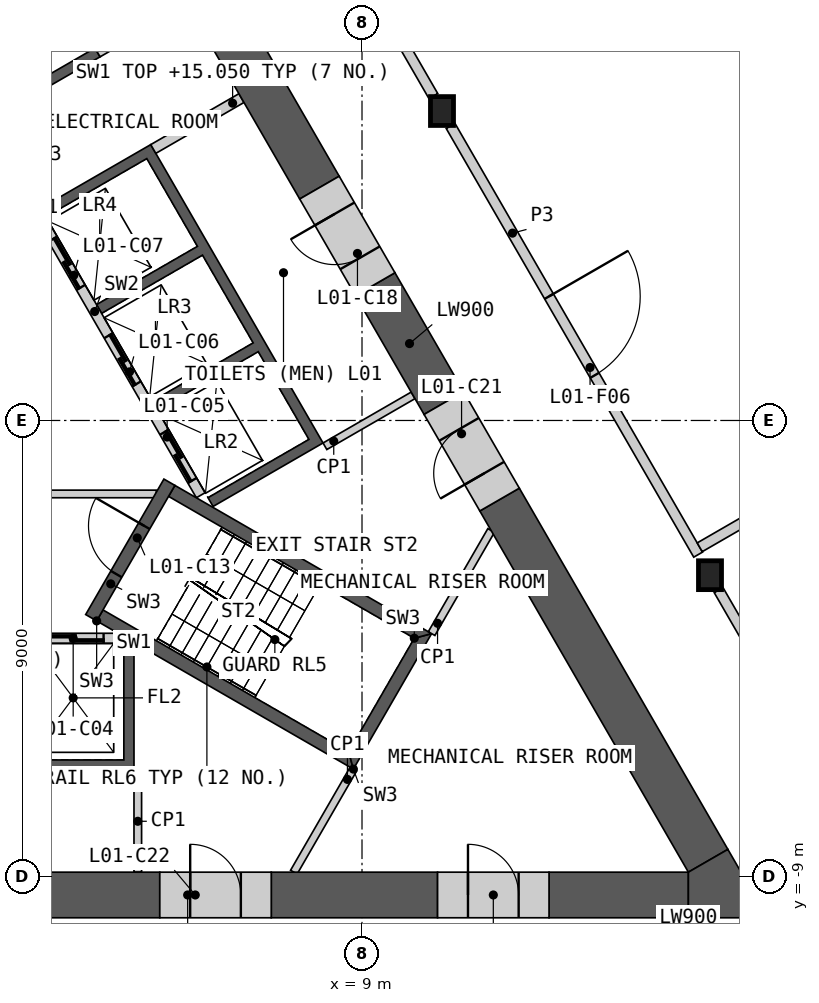
"""IFC4 building model, lengths in metres.
Left out: names, types, materials, properties, quantities, classifications, styles, units other than length and angle.
Written with IfcOpenShell. Run it as: python <this file> out.ifc"""

import sys

from ifc_helpers import new_model, si_unit, direction, frame, frame_2d, origin, origin_2d, place, context, subcontext, project, spatial, polyline, rectangle, i_section, outline, extrude, element, fill, save


model = new_model("IFC4")
c1 = context("Model", 3, precision=1e-05, world=origin(), true_north=direction((0.0, 1.0)))
c2 = subcontext(c1, "Body", "Model", "MODEL_VIEW")
j1 = project(units=[si_unit("LENGTHUNIT", "METRE"), si_unit("PLANEANGLEUNIT", "RADIAN")], contexts=[c1])
p1 = place(None, origin())
s1 = spatial("IfcSite", under=j1, at=p1, CompositionType="ELEMENT")
p2 = place(p1, origin())
s2 = spatial("IfcBuilding", under=s1, at=p2, CompositionType="ELEMENT")
p3 = place(p2, frame((0.0, 0.0, 10.0)))
s3 = spatial("IfcBuildingStorey", under=s2, at=p3, CompositionType="ELEMENT", Elevation=10.0)
for number, where, z_axis, x_axis in (
    (1, (15.868, -3.054, 0.0), (0.0, 0.0, 1.0), (1.0, 0.0, 0.0)),
    (2, (10.578, 6.107, 0.0), (0.0, 0.0, 1.0), (1.0, 0.0, 0.0)),
):
    element("IfcColumn", number, at=place(p3, frame(where, z_axis=z_axis, x_axis=x_axis)), inside=s3, PredefinedType="COLUMN", context=c2, shape_type="SweptSolid", body=[
        extrude(i_section(OverallWidth=0.454, OverallDepth=0.57, WebThickness=0.078, FlangeThickness=0.125, at=origin_2d()), origin(), (0.0, 0.0, 1.0), 5.5),
    ])
p4 = place(p3, origin())
e3 = element("IfcWall", 3, at=p4, inside=s3, PredefinedType="SHEAR", context=c2, shape_type="SweptSolid", body=[
    extrude(outline(polyline([(4.5, -4.4), (4.5, -6.906), (-4.5, -6.906), (-4.5, -4.4), (-4.3, -4.4), (-4.3, -6.7), (-2.3, -6.7), (-2.3, -4.4), (-2.1, -4.4), (-2.1, -6.7), (-0.1, -6.7), (-0.1, -4.4), (0.1, -4.4), (0.1, -6.7), (2.1, -6.7), (2.1, -4.4), (2.3, -4.4), (2.3, -6.7), (4.3, -6.7), (4.3, -4.4), (4.5, -4.4)])), origin(), (0.0, 0.0, 1.0), 5.05),
])
p5 = place(p3, frame((-4.187, -4.3, 0.0), z_axis=(0.0, 0.0, 1.0), x_axis=(1.0, 0.0, 0.0)))
e4 = element("IfcWall", 4, at=p5, inside=s3, PredefinedType="SOLIDWALL", context=c2, shape_type="SweptSolid", body=[
    extrude(rectangle(XDim=8.373, YDim=0.2, at=frame_2d((4.187, 0.0))), origin(), (0.0, 0.0, 1.0), 5.05),
])
p6 = place(p5, frame((0.287, 0.0, 0.0)))
e5 = element("IfcOpeningElement", 5, at=p6, cuts=e4, PredefinedType="OPENING", context=c2, shape_type="SweptSolid", body=[
    extrude(rectangle(XDim=1.2, YDim=2.1, at=frame_2d((0.6, 1.05))), frame((0.0, 0.11, 0.0), z_axis=(0.0, -1.0, 0.0), x_axis=(1.0, 0.0, 0.0)), (0.0, 0.0, 1.0), 0.22),
])
p7 = place(p5, frame((2.387, 0.0, 0.0)))
e6 = element("IfcOpeningElement", 6, at=p7, cuts=e4, PredefinedType="OPENING", context=c2, shape_type="SweptSolid", body=[
    extrude(rectangle(XDim=1.4, YDim=2.1, at=frame_2d((0.7, 1.05))), frame((0.0, 0.11, 0.0), z_axis=(0.0, -1.0, 0.0), x_axis=(1.0, 0.0, 0.0)), (0.0, 0.0, 1.0), 0.22),
])
p8 = place(p5, frame((4.737, 0.0, 0.0)))
e7 = element("IfcOpeningElement", 7, at=p8, cuts=e4, PredefinedType="OPENING", context=c2, shape_type="SweptSolid", body=[
    extrude(rectangle(XDim=1.1, YDim=2.1, at=frame_2d((0.55, 1.05))), frame((0.0, 0.11, 0.0), z_axis=(0.0, -1.0, 0.0), x_axis=(1.0, 0.0, 0.0)), (0.0, 0.0, 1.0), 0.22),
])
p9 = place(p5, frame((6.887, 0.0, 0.0)))
e8 = element("IfcOpeningElement", 8, at=p9, cuts=e4, PredefinedType="OPENING", context=c2, shape_type="SweptSolid", body=[
    extrude(rectangle(XDim=1.2, YDim=2.1, at=frame_2d((0.6, 1.05))), frame((0.0, 0.11, 0.0), z_axis=(0.0, -1.0, 0.0), x_axis=(1.0, 0.0, 0.0)), (0.0, 0.0, 1.0), 0.22),
])
p10 = place(p3, origin())
e9 = element("IfcWall", 9, at=p10, inside=s3, PredefinedType="SHEAR", context=c2, shape_type="SweptSolid", body=[
    extrude(outline(polyline([(1.561, 6.097), (3.731, 7.35), (3.831, 7.177), (1.66, 5.924), (1.561, 6.097)])), origin(), (0.0, 0.0, 1.0), 5.05),
])
p11 = place(p3, origin())
e10 = element("IfcWall", 10, at=p11, inside=s3, PredefinedType="SHEAR", context=c2, shape_type="SweptSolid", body=[
    extrude(outline(polyline([(2.66, 4.192), (4.831, 5.445), (8.231, -0.444), (6.061, -1.697), (5.96, -1.524), (7.952, -0.374), (6.952, 1.358), (4.96, 0.208), (4.861, 0.381), (6.852, 1.531), (5.852, 3.263), (3.861, 2.113), (3.76, 2.287), (5.752, 3.437), (4.752, 5.169), (2.76, 4.019), (2.66, 4.192)])), origin(), (0.0, 0.0, 1.0), 5.05),
])
p12 = place(p3, frame((5.817, -1.476, 0.0), z_axis=(0.0, 0.0, 1.0), x_axis=(-0.500002616675, 0.866023893041, 0.0)))
e11 = element("IfcWall", 11, at=p12, inside=s3, PredefinedType="SOLIDWALL", context=c2, shape_type="SweptSolid", body=[
    extrude(rectangle(XDim=8.373, YDim=0.2, at=frame_2d((4.187, 0.0))), origin(), (0.0, 0.0, 1.0), 5.05),
])
p13 = place(p12, frame((0.337, 0.0, 0.0)))
e12 = element("IfcOpeningElement", 12, at=p13, cuts=e11, PredefinedType="OPENING", context=c2, shape_type="SweptSolid", body=[
    extrude(rectangle(XDim=1.1, YDim=2.1, at=frame_2d((0.55, 1.05))), frame((0.0, 0.11, 0.0), z_axis=(0.0, -1.0, 0.0), x_axis=(1.0, 0.0, 0.0)), (0.0, 0.0, 1.0), 0.22),
])
p14 = place(p12, frame((2.537, 0.0, 0.0)))
e13 = element("IfcOpeningElement", 13, at=p14, cuts=e11, PredefinedType="OPENING", context=c2, shape_type="SweptSolid", body=[
    extrude(rectangle(XDim=1.1, YDim=2.1, at=frame_2d((0.55, 1.05))), frame((0.0, 0.11, 0.0), z_axis=(0.0, -1.0, 0.0), x_axis=(1.0, 0.0, 0.0)), (0.0, 0.0, 1.0), 0.22),
])
p15 = place(p12, frame((4.737, 0.0, 0.0)))
e14 = element("IfcOpeningElement", 14, at=p15, cuts=e11, PredefinedType="OPENING", context=c2, shape_type="SweptSolid", body=[
    extrude(rectangle(XDim=1.1, YDim=2.1, at=frame_2d((0.55, 1.05))), frame((0.0, 0.11, 0.0), z_axis=(0.0, -1.0, 0.0), x_axis=(1.0, 0.0, 0.0)), (0.0, 0.0, 1.0), 0.22),
])
p16 = place(p12, frame((7.037, 0.0, 0.0)))
e15 = element("IfcOpeningElement", 15, at=p16, cuts=e11, PredefinedType="OPENING", context=c2, shape_type="SweptSolid", body=[
    extrude(rectangle(XDim=0.9, YDim=2.1, at=frame_2d((0.45, 1.05))), frame((0.0, 0.11, 0.0), z_axis=(0.0, -1.0, 0.0), x_axis=(1.0, 0.0, 0.0)), (0.0, 0.0, 1.0), 0.22),
])
p17 = place(p3, frame((4.881, 5.358, 0.0), z_axis=(0.0, 0.0, 1.0), x_axis=(0.866035824272, 0.499981950752, 0.0)))
e16 = element("IfcWall", 16, at=p17, inside=s3, PredefinedType="SHEAR", context=c2, shape_type="SweptSolid", body=[
    extrude(rectangle(XDim=2.009, YDim=0.2, at=frame_2d((1.004, 0.0))), origin(), (0.0, 0.0, 1.0), 5.05),
])
p18 = place(p3, frame((3.781, 7.263, 0.0), z_axis=(0.0, 0.0, 1.0), x_axis=(0.865983199114, 0.50007309351, 0.0)))
e17 = element("IfcWall", 17, at=p18, inside=s3, PredefinedType="SHEAR", context=c2, shape_type="SweptSolid", body=[
    extrude(rectangle(XDim=2.009, YDim=0.2, at=frame_2d((1.004, 0.0))), origin(), (0.0, 0.0, 1.0), 5.05),
])
p19 = place(p3, frame((-4.941, -1.45, 0.0), z_axis=(0.0, 0.0, 1.0), x_axis=(1.0, 0.0, 0.0)))
e18 = element("IfcWall", 18, at=p19, inside=s3, PredefinedType="PARTITIONING", context=c2, shape_type="SweptSolid", body=[
    extrude(rectangle(XDim=9.882, YDim=0.15, at=frame_2d((4.941, 0.0))), origin(), (0.0, 0.0, 1.0), 5.05),
])
p20 = place(p19, frame((4.391, 0.0, 0.0)))
e19 = element("IfcOpeningElement", 19, at=p20, cuts=e18, PredefinedType="OPENING", context=c2, shape_type="SweptSolid", body=[
    extrude(rectangle(XDim=1.1, YDim=2.1, at=frame_2d((0.55, 1.05))), frame((0.0, 0.085, 0.0), z_axis=(0.0, -1.0, 0.0), x_axis=(1.0, 0.0, 0.0)), (0.0, 0.0, 1.0), 0.17),
])
p21 = place(p3, origin())
e20 = element("IfcWall", 20, at=p21, inside=s3, PredefinedType="SHEAR", context=c2, shape_type="SweptSolid", body=[
    extrude(outline(polyline([(3.763, -3.956), (8.83, -6.881), (8.738, -6.539), (3.888, -3.739), (3.763, -3.956)])), origin(), (0.0, 0.0, 1.0), 5.05),
])
p22 = place(p3, origin())
e21 = element("IfcWall", 21, at=p22, inside=s3, PredefinedType="SHEAR", context=c2, shape_type="SweptSolid", body=[
    extrude(outline(polyline([(8.83, -6.881), (10.374, -4.206), (10.032, -4.298), (8.738, -6.539), (8.83, -6.881)])), origin(), (0.0, 0.0, 1.0), 5.05),
])
p23 = place(p3, origin())
e22 = element("IfcWall", 22, at=p23, inside=s3, PredefinedType="SHEAR", context=c2, shape_type="SweptSolid", body=[
    extrude(outline(polyline([(10.032, -4.298), (10.374, -4.206), (5.307, -1.281), (5.182, -1.498), (10.032, -4.298)])), origin(), (0.0, 0.0, 1.0), 5.05),
])
p24 = place(p3, frame((3.655, -3.893, 0.0), z_axis=(0.0, 0.0, 1.0), x_axis=(0.499982516597, 0.866035497597, 0.0)))
e23 = element("IfcWall", 23, at=p24, inside=s3, PredefinedType="SHEAR", context=c2, shape_type="SweptSolid", body=[
    extrude(rectangle(XDim=3.088, YDim=0.25, at=frame_2d((1.544, 0.0))), origin(), (0.0, 0.0, 1.0), 5.05),
])
p25 = place(p24, frame((0.994, 0.0, 0.0)))
e24 = element("IfcOpeningElement", 24, at=p25, cuts=e23, PredefinedType="OPENING", context=c2, shape_type="SweptSolid", body=[
    extrude(rectangle(XDim=1.1, YDim=2.1, at=frame_2d((0.55, 1.05))), frame((0.0, 0.135, 0.0), z_axis=(0.0, -1.0, 0.0), x_axis=(1.0, 0.0, 0.0)), (0.0, 0.0, 1.0), 0.27),
])
p26 = place(p3, frame((4.575, -6.906, 0.0), z_axis=(0.0, 0.0, 1.0), x_axis=(0.0, -1.0, 0.0)))
e25 = element("IfcWall", 25, at=p26, inside=s3, PredefinedType="PARTITIONING", context=c2, shape_type="SweptSolid", body=[
    extrude(rectangle(XDim=2.009, YDim=0.15, at=frame_2d((1.004, 0.0))), origin(), (0.0, 0.0, 1.0), 5.05),
])
p27 = place(p3, frame((8.268, -0.509, 0.0), z_axis=(0.0, 0.0, 1.0), x_axis=(0.866035824272, 0.499981950752, 0.0)))
e26 = element("IfcWall", 26, at=p27, inside=s3, PredefinedType="PARTITIONING", context=c2, shape_type="SweptSolid", body=[
    extrude(rectangle(XDim=2.009, YDim=0.15, at=frame_2d((1.004, 0.0))), origin(), (0.0, 0.0, 1.0), 5.05),
])
p28 = place(p3, frame((8.83, -6.881, 0.0), z_axis=(0.0, 0.0, 1.0), x_axis=(-0.500073279432, -0.865983091751, 0.0)))
e27 = element("IfcWall", 27, at=p28, inside=s3, PredefinedType="PARTITIONING", context=c2, shape_type="SweptSolid", body=[
    extrude(rectangle(XDim=2.349, YDim=0.15, at=frame_2d((1.175, 0.0))), origin(), (0.0, 0.0, 1.0), 5.05),
])
p29 = place(p3, frame((10.374, -4.206, 0.0), z_axis=(0.0, 0.0, 1.0), x_axis=(0.499995339376, 0.86602809458, 0.0)))
e28 = element("IfcWall", 28, at=p29, inside=s3, PredefinedType="PARTITIONING", context=c2, shape_type="SweptSolid", body=[
    extrude(rectangle(XDim=2.349, YDim=0.15, at=frame_2d((1.175, 0.0))), origin(), (0.0, 0.0, 1.0), 5.05),
])
p30 = place(p3, frame((1.1, -9.365, 0.0), z_axis=(0.0, 0.0, 1.0), x_axis=(1.0, 0.0, 0.0)))
e29 = element("IfcWall", 29, at=p30, inside=s3, PredefinedType="SHEAR", context=c2, shape_type="SweptSolid", body=[
    extrude(rectangle(XDim=3.909, YDim=0.9, at=frame_2d((1.955, 0.0))), origin(), (0.0, 0.0, 1.0), 5.05),
])
p31 = place(p3, frame((7.209, -9.365, 0.0), z_axis=(0.0, 0.0, 1.0), x_axis=(1.0, 0.0, 0.0)))
e30 = element("IfcWall", 30, at=p31, inside=s3, PredefinedType="SHEAR", context=c2, shape_type="SweptSolid", body=[
    extrude(rectangle(XDim=3.282, YDim=0.9, at=frame_2d((1.641, 0.0))), origin(), (0.0, 0.0, 1.0), 5.05),
])
p32 = place(p3, frame((12.691, -9.365, 0.0), z_axis=(0.0, 0.0, 1.0), x_axis=(1.0, 0.0, 0.0)))
e31 = element("IfcWall", 31, at=p32, inside=s3, PredefinedType="SHEAR", context=c2, shape_type="SweptSolid", body=[
    extrude(rectangle(XDim=2.75, YDim=0.9, at=frame_2d((1.375, 0.0))), origin(), (0.0, 0.0, 1.0), 5.05),
])
p33 = place(p3, frame((8.16, 4.596, 0.0), z_axis=(0.0, 0.0, 1.0), x_axis=(-0.500009830349, 0.866019728156, 0.0)))
e32 = element("IfcWall", 32, at=p33, inside=s3, PredefinedType="SHEAR", context=c2, shape_type="SweptSolid", body=[
    extrude(rectangle(XDim=15.541, YDim=0.9, at=frame_2d((7.771, 0.0))), origin(), (0.0, 0.0, 1.0), 5.05),
])
p34 = place(p3, frame((15.831, -8.69, 0.0), z_axis=(0.0, 0.0, 1.0), x_axis=(-0.499995435471, 0.8660280391, 0.0)))
e33 = element("IfcWall", 33, at=p34, inside=s3, PredefinedType="SHEAR", context=c2, shape_type="SweptSolid", body=[
    extrude(rectangle(XDim=8.232, YDim=0.9, at=frame_2d((4.116, 0.0))), origin(), (0.0, 0.0, 1.0), 5.05),
])
p35 = place(p3, frame((10.615, 0.344, 0.0), z_axis=(0.0, 0.0, 1.0), x_axis=(-0.500044870432, 0.865999496279, 0.0)))
e34 = element("IfcWall", 34, at=p35, inside=s3, PredefinedType="SHEAR", context=c2, shape_type="SweptSolid", body=[
    extrude(rectangle(XDim=2.709, YDim=0.9, at=frame_2d((1.354, 0.0))), origin(), (0.0, 0.0, 1.0), 5.05),
])
p36 = place(p3, origin())
e35 = element("IfcWall", 35, at=p36, inside=s3, PredefinedType="SHEAR", context=c2, shape_type="SweptSolid", body=[
    extrude(outline(polyline([(15.441, -9.815), (15.441, -8.915), (16.221, -8.465), (17.0, -9.815), (15.441, -9.815)])), origin(), (0.0, 0.0, 1.0), 5.05),
])
p37 = place(p3, frame((10.491, -9.365, 0.0), z_axis=(0.0, 0.0, 1.0), x_axis=(1.0, 0.0, 0.0)))
e36 = element("IfcWall", 36, at=p37, inside=s3, PredefinedType="SHEAR", context=c2, shape_type="SweptSolid", body=[
    extrude(rectangle(XDim=2.2, YDim=0.9, at=frame_2d((1.1, 0.0))), origin(), (0.0, 0.0, 1.0), 5.05),
])
p38 = place(p37, frame((0.6, 0.0, 0.0)))
e37 = element("IfcOpeningElement", 37, at=p38, cuts=e36, PredefinedType="OPENING", context=c2, shape_type="SweptSolid", body=[
    extrude(rectangle(XDim=1.0, YDim=2.1, at=frame_2d((0.5, 1.05))), frame((0.0, 0.46, 0.0), z_axis=(0.0, -1.0, 0.0), x_axis=(1.0, 0.0, 0.0)), (0.0, 0.0, 1.0), 0.92),
])
p39 = place(p3, frame((9.26, 2.691, 0.0), z_axis=(0.0, 0.0, 1.0), x_axis=(-0.499946605688, 0.86605622881, 0.0)))
e38 = element("IfcWall", 38, at=p39, inside=s3, PredefinedType="SHEAR", context=c2, shape_type="SweptSolid", body=[
    extrude(rectangle(XDim=2.2, YDim=0.9, at=frame_2d((1.1, 0.0))), origin(), (0.0, 0.0, 1.0), 5.05),
])
p40 = place(p39, frame((0.6, 0.0, 0.0)))
e39 = element("IfcOpeningElement", 39, at=p40, cuts=e38, PredefinedType="OPENING", context=c2, shape_type="SweptSolid", body=[
    extrude(rectangle(XDim=1.0, YDim=2.1, at=frame_2d((0.5, 1.05))), frame((0.0, 0.46, 0.0), z_axis=(0.0, -1.0, 0.0), x_axis=(1.0, 0.0, 0.0)), (0.0, 0.0, 1.0), 0.92),
])
p41 = place(p3, frame((11.715, -1.561, 0.0), z_axis=(0.0, 0.0, 1.0), x_axis=(-0.499946605688, 0.86605622881, 0.0)))
e40 = element("IfcWall", 40, at=p41, inside=s3, PredefinedType="SHEAR", context=c2, shape_type="SweptSolid", body=[
    extrude(rectangle(XDim=2.2, YDim=0.9, at=frame_2d((1.1, 0.0))), origin(), (0.0, 0.0, 1.0), 5.05),
])
p42 = place(p41, frame((0.6, 0.0, 0.0)))
e41 = element("IfcOpeningElement", 41, at=p42, cuts=e40, PredefinedType="OPENING", context=c2, shape_type="SweptSolid", body=[
    extrude(rectangle(XDim=1.0, YDim=2.1, at=frame_2d((0.5, 1.05))), frame((0.0, 0.46, 0.0), z_axis=(0.0, -1.0, 0.0), x_axis=(1.0, 0.0, 0.0)), (0.0, 0.0, 1.0), 0.92),
])
p43 = place(p3, frame((5.009, -9.365, 0.0), z_axis=(0.0, 0.0, 1.0), x_axis=(1.0, 0.0, 0.0)))
e42 = element("IfcWall", 42, at=p43, inside=s3, PredefinedType="SHEAR", context=c2, shape_type="SweptSolid", body=[
    extrude(rectangle(XDim=2.2, YDim=0.9, at=frame_2d((1.1, 0.0))), origin(), (0.0, 0.0, 1.0), 5.05),
])
p44 = place(p43, frame((0.6, 0.0, 0.0)))
e43 = element("IfcOpeningElement", 43, at=p44, cuts=e42, PredefinedType="OPENING", context=c2, shape_type="SweptSolid", body=[
    extrude(rectangle(XDim=1.0, YDim=2.1, at=frame_2d((0.5, 1.05))), frame((0.0, 0.46, 0.0), z_axis=(0.0, -1.0, 0.0), x_axis=(1.0, 0.0, 0.0)), (0.0, 0.0, 1.0), 0.92),
])
p45 = place(p3, frame((5.459, 14.974, 0.0), z_axis=(0.0, 0.0, 1.0), x_axis=(0.499985793049, -0.866033606016, 0.0)))
e44 = element("IfcWall", 44, at=p45, inside=s3, PredefinedType="PARTITIONING", context=c2, shape_type="SweptSolid", body=[
    extrude(rectangle(XDim=9.898, YDim=0.2, at=frame_2d((4.949, 0.0))), origin(), (0.0, 0.0, 1.0), 5.05),
])
p46 = place(p3, frame((10.749, 5.813, 0.0), z_axis=(0.0, 0.0, 1.0), x_axis=(0.500017363087, -0.866015378969, 0.0)))
e45 = element("IfcWall", 45, at=p46, inside=s3, PredefinedType="PARTITIONING", context=c2, shape_type="SweptSolid", body=[
    extrude(rectangle(XDim=9.77, YDim=0.2, at=frame_2d((4.885, 0.0))), origin(), (0.0, 0.0, 1.0), 5.05),
])
p47 = place(p46, frame((3.884, 0.0, 0.0)))
e46 = element("IfcOpeningElement", 46, at=p47, cuts=e45, PredefinedType="OPENING", context=c2, shape_type="SweptSolid", body=[
    extrude(rectangle(XDim=1.8, YDim=2.1, at=frame_2d((0.9, 1.05))), frame((0.0, 0.11, 0.0), z_axis=(0.0, -1.0, 0.0), x_axis=(1.0, 0.0, 0.0)), (0.0, 0.0, 1.0), 0.22),
])
p48 = place(p3, frame((16.038, -3.348, 0.0), z_axis=(0.0, 0.0, 1.0), x_axis=(0.499988314375, -0.866032150378, 0.0)))
e47 = element("IfcWall", 47, at=p48, inside=s3, PredefinedType="PARTITIONING", context=c2, shape_type="SweptSolid", body=[
    extrude(rectangle(XDim=6.412, YDim=0.2, at=frame_2d((3.206, 0.0))), origin(), (0.0, 0.0, 1.0), 5.05),
])
p49 = place(p48, frame((2.656, 0.0, 0.0)))
e48 = element("IfcOpeningElement", 48, at=p49, cuts=e47, PredefinedType="OPENING", context=c2, shape_type="SweptSolid", body=[
    extrude(rectangle(XDim=1.0, YDim=2.1, at=frame_2d((0.5, 1.05))), frame((0.0, 0.11, 0.0), z_axis=(0.0, -1.0, 0.0), x_axis=(1.0, 0.0, 0.0)), (0.0, 0.0, 1.0), 0.22),
])
p50 = place(p3, frame((15.665, -2.503, 0.0), z_axis=(0.0, 0.0, 1.0), x_axis=(0.866034070548, 0.499984988425, 0.0)))
e49 = element("IfcWall", 49, at=p50, inside=s3, PredefinedType="PARTITIONING", context=c2, shape_type="SweptSolid", body=[
    extrude(rectangle(XDim=9.982, YDim=0.2, at=frame_2d((4.991, 0.0))), origin(), (0.0, 0.0, 1.0), 5.05),
])
p51 = place(p9, origin())
e50 = element("IfcDoor", 50, at=p51, inside=s3, OperationType="SLIDING_TO_LEFT", PredefinedType="DOOR", context=c2, shape_type="SweptSolid", body=[
    extrude(rectangle(XDim=1.2, YDim=2.1, at=frame_2d((0.6, 1.05))), frame((0.0, 0.025, 0.0), z_axis=(0.0, -1.0, 0.0), x_axis=(1.0, 0.0, 0.0)), (0.0, 0.0, 1.0), 0.05),
])
fill(e8, e50)
p52 = place(p13, origin())
e51 = element("IfcDoor", 51, at=p52, inside=s3, OperationType="SLIDING_TO_LEFT", PredefinedType="DOOR", context=c2, shape_type="SweptSolid", body=[
    extrude(rectangle(XDim=1.1, YDim=2.1, at=frame_2d((0.55, 1.05))), frame((0.0, 0.025, 0.0), z_axis=(0.0, -1.0, 0.0), x_axis=(1.0, 0.0, 0.0)), (0.0, 0.0, 1.0), 0.05),
])
fill(e12, e51)
p53 = place(p14, origin())
e52 = element("IfcDoor", 52, at=p53, inside=s3, OperationType="SLIDING_TO_LEFT", PredefinedType="DOOR", context=c2, shape_type="SweptSolid", body=[
    extrude(rectangle(XDim=1.1, YDim=2.1, at=frame_2d((0.55, 1.05))), frame((0.0, 0.025, 0.0), z_axis=(0.0, -1.0, 0.0), x_axis=(1.0, 0.0, 0.0)), (0.0, 0.0, 1.0), 0.05),
])
fill(e13, e52)
p54 = place(p15, origin())
e53 = element("IfcDoor", 53, at=p54, inside=s3, OperationType="SLIDING_TO_LEFT", PredefinedType="DOOR", context=c2, shape_type="SweptSolid", body=[
    extrude(rectangle(XDim=1.1, YDim=2.1, at=frame_2d((0.55, 1.05))), frame((0.0, 0.025, 0.0), z_axis=(0.0, -1.0, 0.0), x_axis=(1.0, 0.0, 0.0)), (0.0, 0.0, 1.0), 0.05),
])
fill(e14, e53)
p55 = place(p25, origin())
e54 = element("IfcDoor", 54, at=p55, inside=s3, OperationType="SINGLE_SWING_RIGHT", PredefinedType="DOOR", context=c2, shape_type="SweptSolid", body=[
    extrude(rectangle(XDim=1.1, YDim=2.1, at=frame_2d((0.55, 1.05))), frame((0.0, 0.025, 0.0), z_axis=(0.0, -1.0, 0.0), x_axis=(1.0, 0.0, 0.0)), (0.0, 0.0, 1.0), 0.05),
])
fill(e24, e54)
p56 = place(p38, origin())
e55 = element("IfcDoor", 55, at=p56, inside=s3, OperationType="SINGLE_SWING_LEFT", PredefinedType="DOOR", context=c2, shape_type="SweptSolid", body=[
    extrude(rectangle(XDim=1.0, YDim=2.1, at=frame_2d((0.5, 1.05))), frame((0.0, 0.205, 0.0), z_axis=(0.0, -1.0, 0.0), x_axis=(1.0, 0.0, 0.0)), (0.0, 0.0, 1.0), 0.05),
])
fill(e37, e55)
p57 = place(p40, origin())
e56 = element("IfcDoor", 56, at=p57, inside=s3, OperationType="SINGLE_SWING_RIGHT", PredefinedType="DOOR", context=c2, shape_type="SweptSolid", body=[
    extrude(rectangle(XDim=1.0, YDim=2.1, at=frame_2d((0.5, 1.05))), frame((0.0, 0.205, 0.0), z_axis=(0.0, -1.0, 0.0), x_axis=(1.0, 0.0, 0.0)), (0.0, 0.0, 1.0), 0.05),
])
fill(e39, e56)
p58 = place(p42, origin())
e57 = element("IfcDoor", 57, at=p58, inside=s3, OperationType="SINGLE_SWING_LEFT", PredefinedType="DOOR", context=c2, shape_type="SweptSolid", body=[
    extrude(rectangle(XDim=1.0, YDim=2.1, at=frame_2d((0.5, 1.05))), frame((0.0, 0.205, 0.0), z_axis=(0.0, -1.0, 0.0), x_axis=(1.0, 0.0, 0.0)), (0.0, 0.0, 1.0), 0.05),
])
fill(e41, e57)
p59 = place(p44, origin())
e58 = element("IfcDoor", 58, at=p59, inside=s3, OperationType="SINGLE_SWING_LEFT", PredefinedType="DOOR", context=c2, shape_type="SweptSolid", body=[
    extrude(rectangle(XDim=1.0, YDim=2.1, at=frame_2d((0.5, 1.05))), frame((0.0, 0.205, 0.0), z_axis=(0.0, -1.0, 0.0), x_axis=(1.0, 0.0, 0.0)), (0.0, 0.0, 1.0), 0.05),
])
fill(e43, e58)
p60 = place(p47, origin())
e59 = element("IfcDoor", 59, at=p60, inside=s3, OperationType="DOUBLE_DOOR_SINGLE_SWING", PredefinedType="DOOR", context=c2, shape_type="SweptSolid", body=[
    extrude(rectangle(XDim=1.8, YDim=2.1, at=frame_2d((0.9, 1.05))), frame((0.0, 0.025, 0.0), z_axis=(0.0, -1.0, 0.0), x_axis=(1.0, 0.0, 0.0)), (0.0, 0.0, 1.0), 0.05),
])
fill(e46, e59)
save(model, sys.argv[1])
